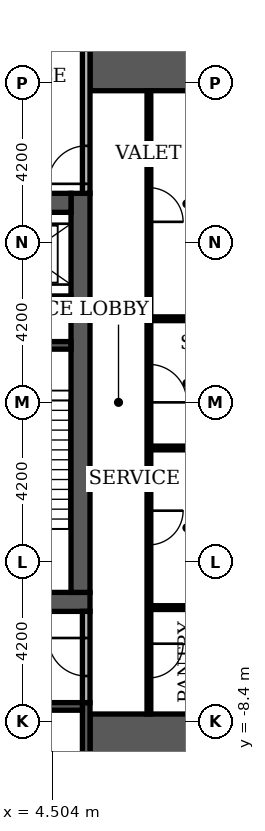
"""IFC4 building model, lengths in metres.
Left out: names, types, materials, properties, quantities, classifications, styles, units other than length and angle.
Written with IfcOpenShell. Run it as: python <this file> out.ifc"""

import sys

from ifc_helpers import new_model, si_unit, direction, frame, frame_2d, origin, place, context, subcontext, project, spatial, rectangle, extrude, element, fill, save


model = new_model("IFC4")
c1 = context("Model", 3, precision=1e-05, world=origin(), true_north=direction((0.0, 1.0)))
c2 = subcontext(c1, "Body", "Model", "MODEL_VIEW")
j1 = project(units=[si_unit("LENGTHUNIT", "METRE"), si_unit("PLANEANGLEUNIT", "RADIAN")], contexts=[c1])
p1 = place(None, origin())
s1 = spatial("IfcSite", under=j1, at=p1, CompositionType="ELEMENT")
p2 = place(p1, origin())
s2 = spatial("IfcBuilding", under=s1, at=p2, CompositionType="ELEMENT")
p3 = place(p2, frame((0.0, 0.0, 7.2)))
s3 = spatial("IfcBuildingStorey", under=s2, at=p3, CompositionType="ELEMENT", Elevation=7.2)
p4 = place(p3, frame((-5.5, -5.25, 0.0), z_axis=(0.0, 0.0, 1.0), x_axis=(1.0, 0.0, 0.0)))
e1 = element("IfcWall", 1, at=p4, inside=s3, PredefinedType="SHEAR", context=c2, shape_type="SweptSolid", body=[
    extrude(rectangle(XDim=11.0, YDim=0.5, at=frame_2d((5.5, 0.0))), origin(), (0.0, 0.0, 1.0), 4.38),
])
p5 = place(p4, frame((4.9, 0.0, 0.0)))
e2 = element("IfcOpeningElement", 2, at=p5, cuts=e1, PredefinedType="OPENING", context=c2, shape_type="SweptSolid", body=[
    extrude(rectangle(XDim=1.2, YDim=2.1, at=frame_2d((0.6, 1.05))), frame((0.0, 0.26, 0.0), z_axis=(0.0, -1.0, 0.0), x_axis=(1.0, 0.0, 0.0)), (0.0, 0.0, 1.0), 0.52),
])
p6 = place(p3, frame((5.25, -5.0, 0.0), z_axis=(0.0, 0.0, 1.0), x_axis=(0.0, 1.0, 0.0)))
e3 = element("IfcWall", 3, at=p6, inside=s3, PredefinedType="SHEAR", context=c2, shape_type="SweptSolid", body=[
    extrude(rectangle(XDim=10.5, YDim=0.5, at=frame_2d((5.25, 0.0))), origin(), (0.0, 0.0, 1.0), 4.38),
])
p7 = place(p3, frame((-5.0, 5.25, 0.0), z_axis=(0.0, 0.0, 1.0), x_axis=(1.0, 0.0, 0.0)))
e4 = element("IfcWall", 4, at=p7, inside=s3, PredefinedType="SHEAR", context=c2, shape_type="SweptSolid", body=[
    extrude(rectangle(XDim=10.0, YDim=0.5, at=frame_2d((5.0, 0.0))), origin(), (0.0, 0.0, 1.0), 4.38),
])
p8 = place(p7, frame((4.4, 0.0, 0.0)))
e5 = element("IfcOpeningElement", 5, at=p8, cuts=e4, PredefinedType="OPENING", context=c2, shape_type="SweptSolid", body=[
    extrude(rectangle(XDim=1.2, YDim=2.1, at=frame_2d((0.6, 1.05))), frame((0.0, 0.26, 0.0), z_axis=(0.0, -1.0, 0.0), x_axis=(1.0, 0.0, 0.0)), (0.0, 0.0, 1.0), 0.52),
])
for number, where, z_axis, x_axis in (
    (6, (5.5, -9.15, 0.0), (0.0, 0.0, 1.0), (1.0, 0.0, 0.0)),
    (7, (5.5, 9.15, 0.0), (0.0, 0.0, 1.0), (1.0, 0.0, 0.0)),
):
    element("IfcWall", number, at=place(p3, frame(where, z_axis=z_axis, x_axis=x_axis)), inside=s3, PredefinedType="SHEAR", context=c2, shape_type="SweptSolid", body=[
        extrude(rectangle(XDim=4.6, YDim=1.9, at=frame_2d((2.3, 0.0))), origin(), (0.0, 0.0, 1.0), 4.38),
    ])
p9 = place(p3, frame((2.15, 1.5, 0.0), z_axis=(0.0, 0.0, 1.0), x_axis=(1.0, 0.0, 0.0)))
e8 = element("IfcWall", 8, at=p9, inside=s3, PredefinedType="SHEAR", context=c2, shape_type="SweptSolid", body=[
    extrude(rectangle(XDim=2.85, YDim=0.2, at=frame_2d((1.425, 0.0))), origin(), (0.0, 0.0, 1.0), 4.38),
])
p10 = place(p3, frame((5.4, -10.1, 0.0), z_axis=(0.0, 0.0, 1.0), x_axis=(0.0, 1.0, 0.0)))
e9 = element("IfcWall", 9, at=p10, inside=s3, PredefinedType="SHEAR", context=c2, shape_type="SweptSolid", body=[
    extrude(rectangle(XDim=2.2, YDim=0.2, at=frame_2d((1.1, 0.0))), origin(), (0.0, 0.0, 1.0), 4.38),
])
p11 = place(p3, frame((2.8, -8.0, 0.0), z_axis=(0.0, 0.0, 1.0), x_axis=(1.0, 0.0, 0.0)))
e10 = element("IfcWall", 10, at=p11, inside=s3, PredefinedType="SHEAR", context=c2, shape_type="SweptSolid", body=[
    extrude(rectangle(XDim=2.5, YDim=0.2, at=frame_2d((1.25, 0.0))), origin(), (0.0, 0.0, 1.0), 4.38),
])
p12 = place(p3, frame((2.15, 2.7, 0.0), z_axis=(0.0, 0.0, 1.0), x_axis=(1.0, 0.0, 0.0)))
e11 = element("IfcWall", 11, at=p12, inside=s3, PredefinedType="SHEAR", context=c2, shape_type="SweptSolid", body=[
    extrude(rectangle(XDim=2.85, YDim=0.2, at=frame_2d((1.425, 0.0))), origin(), (0.0, 0.0, 1.0), 4.38),
])
p13 = place(p3, frame((7.05, -8.2, 0.0), z_axis=(0.0, 0.0, 1.0), x_axis=(0.0, 1.0, 0.0)))
e12 = element("IfcWall", 12, at=p13, inside=s3, PredefinedType="PARTITIONING", context=c2, shape_type="SweptSolid", body=[
    extrude(rectangle(XDim=16.4, YDim=0.1, at=frame_2d((8.2, 0.0))), origin(), (0.0, 0.0, 1.0), 4.38),
])
p14 = place(p13, frame((0.95, 0.0, 0.0)))
e13 = element("IfcOpeningElement", 13, at=p14, cuts=e12, PredefinedType="OPENING", context=c2, shape_type="SweptSolid", body=[
    extrude(rectangle(XDim=0.9, YDim=2.1, at=frame_2d((0.45, 1.05))), frame((0.0, 0.06, 0.0), z_axis=(0.0, -1.0, 0.0), x_axis=(1.0, 0.0, 0.0)), (0.0, 0.0, 1.0), 0.12),
])
p15 = place(p13, frame((4.45, 0.0, 0.0)))
e14 = element("IfcOpeningElement", 14, at=p15, cuts=e12, PredefinedType="OPENING", context=c2, shape_type="SweptSolid", body=[
    extrude(rectangle(XDim=0.9, YDim=2.1, at=frame_2d((0.45, 1.05))), frame((0.0, 0.06, 0.0), z_axis=(0.0, -1.0, 0.0), x_axis=(1.0, 0.0, 0.0)), (0.0, 0.0, 1.0), 0.12),
])
p16 = place(p13, frame((8.2, 0.0, 0.0)))
e15 = element("IfcOpeningElement", 15, at=p16, cuts=e12, PredefinedType="OPENING", context=c2, shape_type="SweptSolid", body=[
    extrude(rectangle(XDim=1.0, YDim=2.1, at=frame_2d((0.5, 1.05))), frame((0.0, 0.06, 0.0), z_axis=(0.0, -1.0, 0.0), x_axis=(1.0, 0.0, 0.0)), (0.0, 0.0, 1.0), 0.12),
])
p17 = place(p13, frame((12.95, 0.0, 0.0)))
e16 = element("IfcOpeningElement", 16, at=p17, cuts=e12, PredefinedType="OPENING", context=c2, shape_type="SweptSolid", body=[
    extrude(rectangle(XDim=0.9, YDim=2.1, at=frame_2d((0.45, 1.05))), frame((0.0, 0.06, 0.0), z_axis=(0.0, -1.0, 0.0), x_axis=(1.0, 0.0, 0.0)), (0.0, 0.0, 1.0), 0.12),
])
p18 = place(p3, frame((5.4, -7.9, 0.0), z_axis=(0.0, 0.0, 1.0), x_axis=(0.0, 1.0, 0.0)))
e17 = element("IfcWall", 17, at=p18, inside=s3, PredefinedType="PARTITIONING", context=c2, shape_type="SweptSolid", body=[
    extrude(rectangle(XDim=2.4, YDim=0.2, at=frame_2d((1.2, 0.0))), origin(), (0.0, 0.0, 1.0), 4.38),
])
p19 = place(p18, frame((0.7, 0.0, 0.0)))
e18 = element("IfcOpeningElement", 18, at=p19, cuts=e17, PredefinedType="OPENING", context=c2, shape_type="SweptSolid", body=[
    extrude(rectangle(XDim=1.0, YDim=2.1, at=frame_2d((0.5, 1.05))), frame((0.0, 0.11, 0.0), z_axis=(0.0, -1.0, 0.0), x_axis=(1.0, 0.0, 0.0)), (0.0, 0.0, 1.0), 0.22),
])
for number, where, z_axis, x_axis in (
    (19, (7.1, -5.4, 0.0), (0.0, 0.0, 1.0), (1.0, 0.0, 0.0)),
    (20, (7.1, -1.2, 0.0), (0.0, 0.0, 1.0), (1.0, 0.0, 0.0)),
    (21, (7.1, 2.2, 0.0), (0.0, 0.0, 1.0), (1.0, 0.0, 0.0)),
):
    element("IfcWall", number, at=place(p3, frame(where, z_axis=z_axis, x_axis=x_axis)), inside=s3, PredefinedType="PARTITIONING", context=c2, shape_type="SweptSolid", body=[
        extrude(rectangle(XDim=1.9, YDim=0.1, at=frame_2d((0.95, 0.0))), origin(), (0.0, 0.0, 1.0), 4.38),
    ])
p20 = place(p3, frame((5.4, 5.5, 0.0), z_axis=(0.0, 0.0, 1.0), x_axis=(0.0, 1.0, 0.0)))
e22 = element("IfcWall", 22, at=p20, inside=s3, PredefinedType="PARTITIONING", context=c2, shape_type="SweptSolid", body=[
    extrude(rectangle(XDim=4.6, YDim=0.2, at=frame_2d((2.3, 0.0))), origin(), (0.0, 0.0, 1.0), 4.38),
])
p21 = place(p20, frame((0.25, 0.0, 0.0)))
e23 = element("IfcOpeningElement", 23, at=p21, cuts=e22, PredefinedType="OPENING", context=c2, shape_type="SweptSolid", body=[
    extrude(rectangle(XDim=1.0, YDim=2.1, at=frame_2d((0.5, 1.05))), frame((0.0, 0.11, 0.0), z_axis=(0.0, -1.0, 0.0), x_axis=(1.0, 0.0, 0.0)), (0.0, 0.0, 1.0), 0.22),
])
p22 = place(p21, origin())
e24 = element("IfcDoor", 24, at=p22, inside=s3, OperationType="SINGLE_SWING_LEFT", PredefinedType="DOOR", context=c2, shape_type="SweptSolid", body=[
    extrude(rectangle(XDim=1.0, YDim=2.1, at=frame_2d((0.5, 1.05))), frame((0.0, 0.025, 0.0), z_axis=(0.0, -1.0, 0.0), x_axis=(1.0, 0.0, 0.0)), (0.0, 0.0, 1.0), 0.05),
])
fill(e23, e24)
p23 = place(p19, origin())
e25 = element("IfcDoor", 25, at=p23, inside=s3, OperationType="SINGLE_SWING_RIGHT", PredefinedType="DOOR", context=c2, shape_type="SweptSolid", body=[
    extrude(rectangle(XDim=1.0, YDim=2.1, at=frame_2d((0.5, 1.05))), frame((0.0, 0.025, 0.0), z_axis=(0.0, -1.0, 0.0), x_axis=(1.0, 0.0, 0.0)), (0.0, 0.0, 1.0), 0.05),
])
fill(e18, e25)
p24 = place(p14, frame((0.9, 0.0, 0.0), z_axis=(0.0, 0.0, 1.0), x_axis=(-1.0, 0.0, 0.0)))
e26 = element("IfcDoor", 26, at=p24, inside=s3, OperationType="SINGLE_SWING_RIGHT", PredefinedType="DOOR", context=c2, shape_type="SweptSolid", body=[
    extrude(rectangle(XDim=0.9, YDim=2.1, at=frame_2d((0.45, 1.05))), frame((0.0, 0.025, 0.0), z_axis=(0.0, -1.0, 0.0), x_axis=(1.0, 0.0, 0.0)), (0.0, 0.0, 1.0), 0.05),
])
fill(e13, e26)
p25 = place(p15, frame((0.9, 0.0, 0.0), z_axis=(0.0, 0.0, 1.0), x_axis=(-1.0, 0.0, 0.0)))
e27 = element("IfcDoor", 27, at=p25, inside=s3, OperationType="SINGLE_SWING_RIGHT", PredefinedType="DOOR", context=c2, shape_type="SweptSolid", body=[
    extrude(rectangle(XDim=0.9, YDim=2.1, at=frame_2d((0.45, 1.05))), frame((0.0, 0.025, 0.0), z_axis=(0.0, -1.0, 0.0), x_axis=(1.0, 0.0, 0.0)), (0.0, 0.0, 1.0), 0.05),
])
fill(e14, e27)
p26 = place(p16, frame((1.0, 0.0, 0.0), z_axis=(0.0, 0.0, 1.0), x_axis=(-1.0, 0.0, 0.0)))
e28 = element("IfcDoor", 28, at=p26, inside=s3, OperationType="SINGLE_SWING_LEFT", PredefinedType="DOOR", context=c2, shape_type="SweptSolid", body=[
    extrude(rectangle(XDim=1.0, YDim=2.1, at=frame_2d((0.5, 1.05))), frame((0.0, 0.025, 0.0), z_axis=(0.0, -1.0, 0.0), x_axis=(1.0, 0.0, 0.0)), (0.0, 0.0, 1.0), 0.05),
])
fill(e15, e28)
p27 = place(p17, frame((0.9, 0.0, 0.0), z_axis=(0.0, 0.0, 1.0), x_axis=(-1.0, 0.0, 0.0)))
e29 = element("IfcDoor", 29, at=p27, inside=s3, OperationType="SINGLE_SWING_LEFT", PredefinedType="DOOR", context=c2, shape_type="SweptSolid", body=[
    extrude(rectangle(XDim=0.9, YDim=2.1, at=frame_2d((0.45, 1.05))), frame((0.0, 0.025, 0.0), z_axis=(0.0, -1.0, 0.0), x_axis=(1.0, 0.0, 0.0)), (0.0, 0.0, 1.0), 0.05),
])
fill(e16, e29)
save(model, sys.argv[1])
